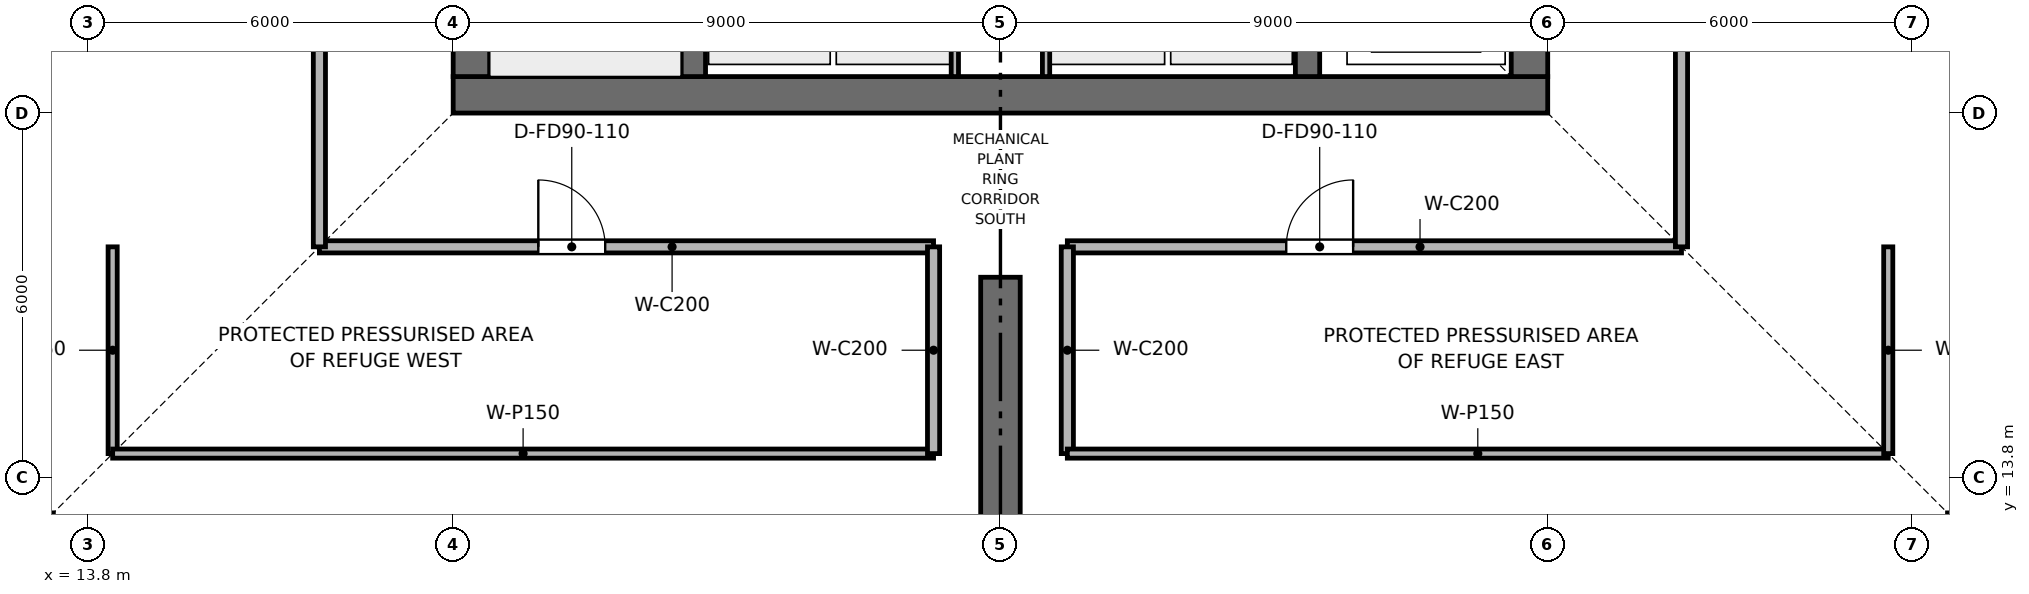
"""IFC4 building model, lengths in metres.
Left out: names, types, materials, properties, quantities, classifications, styles, units other than length and angle.
Written with IfcOpenShell. Run it as: python <this file> out.ifc"""

import sys

from ifc_helpers import new_model, si_unit, direction, frame, frame_2d, origin, origin_2d, place, context, subcontext, project, spatial, rectangle, extrude, element, fill, save


model = new_model("IFC4")
c1 = context("Model", 3, precision=1e-05, world=origin(), true_north=direction((0.0, 1.0)))
c2 = subcontext(c1, "Body", "Model", "MODEL_VIEW")
j1 = project(units=[si_unit("LENGTHUNIT", "METRE"), si_unit("PLANEANGLEUNIT", "RADIAN")], contexts=[c1])
p1 = place(None, origin())
s1 = spatial("IfcSite", under=j1, at=p1, CompositionType="ELEMENT")
p2 = place(p1, origin())
s2 = spatial("IfcBuilding", under=s1, at=p2, CompositionType="ELEMENT")
p3 = place(p2, frame((0.0, 0.0, 284.1)))
s3 = spatial("IfcBuildingStorey", under=s2, at=p3, CompositionType="ELEMENT", Elevation=284.1)
p4 = place(p3, frame((19.8, 20.1, 0.0), z_axis=(0.0, 0.0, 1.0), x_axis=(1.0, 0.0, 0.0)))
e1 = element("IfcWall", 1, at=p4, inside=s3, PredefinedType="SHEAR", context=c2, shape_type="SweptSolid", body=[
    extrude(rectangle(XDim=18.0, YDim=0.6, at=frame_2d((9.0, 0.0))), origin(), (0.0, 0.0, 1.0), 5.4),
])
p5 = place(p3, frame((20.1, 20.4, 0.0), z_axis=(0.0, 0.0, 1.0), x_axis=(0.0, 1.0, 0.0)))
e2 = element("IfcWall", 2, at=p5, inside=s3, PredefinedType="SHEAR", context=c2, shape_type="SweptSolid", body=[
    extrude(rectangle(XDim=16.8, YDim=0.6, at=frame_2d((8.4, 0.0))), origin(), (0.0, 0.0, 1.0), 5.4),
])
p6 = place(p5, frame((10.4, 0.0, 0.0)))
e3 = element("IfcOpeningElement", 3, at=p6, cuts=e2, PredefinedType="OPENING", context=c2, shape_type="SweptSolid", body=[
    extrude(rectangle(XDim=1.1, YDim=2.15, at=frame_2d((0.55, 1.075))), frame((0.0, 0.31, 0.0), z_axis=(0.0, -1.0, 0.0), x_axis=(1.0, 0.0, 0.0)), (0.0, 0.0, 1.0), 0.62),
])
p7 = place(p3, frame((37.5, 20.4, 0.0), z_axis=(0.0, 0.0, 1.0), x_axis=(0.0, 1.0, 0.0)))
e4 = element("IfcWall", 4, at=p7, inside=s3, PredefinedType="SHEAR", context=c2, shape_type="SweptSolid", body=[
    extrude(rectangle(XDim=16.8, YDim=0.6, at=frame_2d((8.4, 0.0))), origin(), (0.0, 0.0, 1.0), 5.4),
])
p8 = place(p7, frame((4.9, 0.0, 0.0)))
e5 = element("IfcOpeningElement", 5, at=p8, cuts=e4, PredefinedType="OPENING", context=c2, shape_type="SweptSolid", body=[
    extrude(rectangle(XDim=1.1, YDim=2.15, at=frame_2d((0.55, 1.075))), frame((0.0, 0.31, 0.0), z_axis=(0.0, -1.0, 0.0), x_axis=(1.0, 0.0, 0.0)), (0.0, 0.0, 1.0), 0.62),
])
for number, where, z_axis, x_axis in (
    (6, (23.75, 20.4, 0.0), (0.0, 0.0, 1.0), (0.0, 1.0, 0.0)),
    (7, (33.85, 20.4, 0.0), (0.0, 0.0, 1.0), (0.0, 1.0, 0.0)),
):
    element("IfcWall", number, at=place(p3, frame(where, z_axis=z_axis, x_axis=x_axis)), inside=s3, PredefinedType="SHEAR", context=c2, shape_type="SweptSolid", body=[
        extrude(rectangle(XDim=16.8, YDim=0.4, at=frame_2d((8.4, 0.0))), origin(), (0.0, 0.0, 1.0), 5.4),
    ])
for number, where, z_axis, x_axis in (
    (8, (12.75, 12.75, 0.003), (0.11, 0.11, 0.988), (-0.707, 0.707, 0.0)),
    (9, (44.85, 12.75, 0.003), (-0.11, 0.11, 0.988), (-0.707, -0.707, 0.0)),
):
    element("IfcColumn", number, at=place(p3, frame(where, z_axis=z_axis, x_axis=x_axis)), inside=s3, PredefinedType="COLUMN", context=c2, shape_type="SweptSolid", body=[
        extrude(rectangle(XDim=0.95, YDim=0.95, at=origin_2d()), origin(), (0.0, 0.0, 1.0), 5.106),
    ])
p9 = place(p3, frame((28.8, 17.1, 0.0), z_axis=(0.0, 0.0, 1.0), x_axis=(0.0, -1.0, 0.0)))
e10 = element("IfcWall", 10, at=p9, inside=s3, PredefinedType="SHEAR", context=c2, shape_type="SweptSolid", body=[
    extrude(rectangle(XDim=10.025, YDim=0.65, at=frame_2d((5.013, 0.0))), origin(), (0.0, 0.0, 1.0), 5.05),
])
for number, where, z_axis, x_axis in (
    (11, (28.05, 20.4, 0.0), (0.0, 0.0, 1.0), (0.0, 1.0, 0.0)),
    (12, (29.55, 20.4, 0.0), (0.0, 0.0, 1.0), (0.0, 1.0, 0.0)),
):
    element("IfcWall", number, at=place(p3, frame(where, z_axis=z_axis, x_axis=x_axis)), inside=s3, PredefinedType="PARTITIONING", context=c2, shape_type="SweptSolid", body=[
        extrude(rectangle(XDim=2.75, YDim=0.12, at=frame_2d((1.375, 0.0))), origin(), (0.0, 0.0, 1.0), 5.05),
    ])
p10 = place(p3, frame((17.6, 17.6, 0.0), z_axis=(0.0, 0.0, 1.0), x_axis=(1.0, 0.0, 0.0)))
e13 = element("IfcWall", 13, at=p10, inside=s3, PredefinedType="PARTITIONING", context=c2, shape_type="SweptSolid", body=[
    extrude(rectangle(XDim=10.1, YDim=0.2, at=frame_2d((5.05, 0.0))), origin(), (0.0, 0.0, 1.0), 4.635),
])
p11 = place(p10, frame((3.6, 0.0, 0.0)))
e14 = element("IfcOpeningElement", 14, at=p11, cuts=e13, PredefinedType="OPENING", context=c2, shape_type="SweptSolid", body=[
    extrude(rectangle(XDim=1.1, YDim=2.15, at=frame_2d((0.55, 1.075))), frame((0.0, 0.11, 0.0), z_axis=(0.0, -1.0, 0.0), x_axis=(1.0, 0.0, 0.0)), (0.0, 0.0, 1.0), 0.22),
])
p12 = place(p3, frame((29.9, 17.6, 0.0), z_axis=(0.0, 0.0, 1.0), x_axis=(1.0, 0.0, 0.0)))
e15 = element("IfcWall", 15, at=p12, inside=s3, PredefinedType="PARTITIONING", context=c2, shape_type="SweptSolid", body=[
    extrude(rectangle(XDim=10.1, YDim=0.2, at=frame_2d((5.05, 0.0))), origin(), (0.0, 0.0, 1.0), 4.635),
])
p13 = place(p12, frame((3.6, 0.0, 0.0)))
e16 = element("IfcOpeningElement", 16, at=p13, cuts=e15, PredefinedType="OPENING", context=c2, shape_type="SweptSolid", body=[
    extrude(rectangle(XDim=1.1, YDim=2.15, at=frame_2d((0.55, 1.075))), frame((0.0, 0.11, 0.0), z_axis=(0.0, -1.0, 0.0), x_axis=(1.0, 0.0, 0.0)), (0.0, 0.0, 1.0), 0.22),
])
for number, where, z_axis, x_axis in (
    (17, (17.6, 17.6, 0.0), (0.0, 0.0, 1.0), (0.0, 1.0, 0.0)),
    (18, (40.0, 17.6, 0.0), (0.0, 0.0, 1.0), (0.0, 1.0, 0.0)),
):
    element("IfcWall", number, at=place(p3, frame(where, z_axis=z_axis, x_axis=x_axis)), inside=s3, PredefinedType="PARTITIONING", context=c2, shape_type="SweptSolid", body=[
        extrude(rectangle(XDim=10.1, YDim=0.2, at=frame_2d((5.05, 0.0))), origin(), (0.0, 0.0, 1.0), 4.635),
    ])
p14 = place(p3, frame((14.2, 14.2, 0.0), z_axis=(0.0, 0.0, 1.0), x_axis=(0.0, 1.0, 0.0)))
e19 = element("IfcWall", 19, at=p14, inside=s3, PredefinedType="PARTITIONING", context=c2, shape_type="SweptSolid", body=[
    extrude(rectangle(XDim=3.4, YDim=0.15, at=frame_2d((1.7, 0.0))), origin(), (0.0, 0.0, 1.0), 4.635),
])
p15 = place(p3, frame((14.2, 14.2, 0.0), z_axis=(0.0, 0.0, 1.0), x_axis=(1.0, 0.0, 0.0)))
e20 = element("IfcWall", 20, at=p15, inside=s3, PredefinedType="PARTITIONING", context=c2, shape_type="SweptSolid", body=[
    extrude(rectangle(XDim=13.5, YDim=0.15, at=frame_2d((6.75, 0.0))), origin(), (0.0, 0.0, 1.0), 4.635),
])
for number, where, z_axis, x_axis in (
    (21, (27.7, 14.2, 0.0), (0.0, 0.0, 1.0), (0.0, 1.0, 0.0)),
    (22, (29.9, 14.2, 0.0), (0.0, 0.0, 1.0), (0.0, 1.0, 0.0)),
):
    element("IfcWall", number, at=place(p3, frame(where, z_axis=z_axis, x_axis=x_axis)), inside=s3, PredefinedType="PARTITIONING", context=c2, shape_type="SweptSolid", body=[
        extrude(rectangle(XDim=3.4, YDim=0.2, at=frame_2d((1.7, 0.0))), origin(), (0.0, 0.0, 1.0), 4.675),
    ])
p16 = place(p3, frame((29.9, 14.2, 0.0), z_axis=(0.0, 0.0, 1.0), x_axis=(1.0, 0.0, 0.0)))
e23 = element("IfcWall", 23, at=p16, inside=s3, PredefinedType="PARTITIONING", context=c2, shape_type="SweptSolid", body=[
    extrude(rectangle(XDim=13.5, YDim=0.15, at=frame_2d((6.75, 0.0))), origin(), (0.0, 0.0, 1.0), 4.635),
])
p17 = place(p3, frame((43.4, 14.2, 0.0), z_axis=(0.0, 0.0, 1.0), x_axis=(0.0, 1.0, 0.0)))
e24 = element("IfcWall", 24, at=p17, inside=s3, PredefinedType="PARTITIONING", context=c2, shape_type="SweptSolid", body=[
    extrude(rectangle(XDim=3.4, YDim=0.15, at=frame_2d((1.7, 0.0))), origin(), (0.0, 0.0, 1.0), 4.635),
])
p18 = place(p11, origin())
e25 = element("IfcDoor", 25, at=p18, inside=s3, OperationType="SINGLE_SWING_LEFT", PredefinedType="DOOR", context=c2, shape_type="SweptSolid", body=[
    extrude(rectangle(XDim=1.1, YDim=2.15, at=frame_2d((0.55, 1.075))), frame((0.0, 0.025, 0.0), z_axis=(0.0, -1.0, 0.0), x_axis=(1.0, 0.0, 0.0)), (0.0, 0.0, 1.0), 0.05),
])
fill(e14, e25)
p19 = place(p13, origin())
e26 = element("IfcDoor", 26, at=p19, inside=s3, OperationType="SINGLE_SWING_RIGHT", PredefinedType="DOOR", context=c2, shape_type="SweptSolid", body=[
    extrude(rectangle(XDim=1.1, YDim=2.15, at=frame_2d((0.55, 1.075))), frame((0.0, 0.025, 0.0), z_axis=(0.0, -1.0, 0.0), x_axis=(1.0, 0.0, 0.0)), (0.0, 0.0, 1.0), 0.05),
])
fill(e16, e26)
save(model, sys.argv[1])
